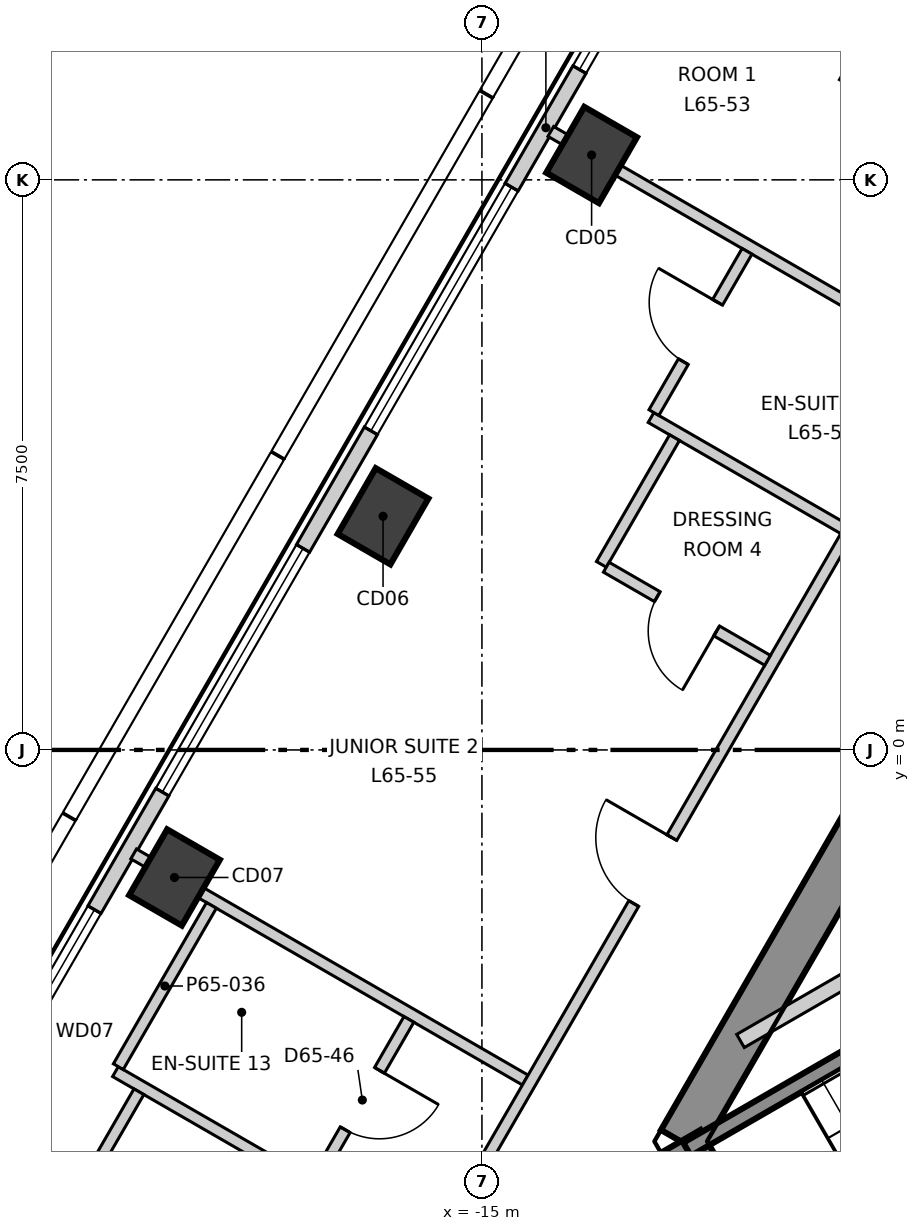
"""IFC4 building model, lengths in metres.
Left out: names, types, materials, properties, quantities, classifications, styles, units other than length and angle.
Written with IfcOpenShell. Run it as: python <this file> out.ifc"""

import sys

from ifc_helpers import new_model, si_unit, direction, frame, frame_2d, origin, origin_2d, place, context, subcontext, project, spatial, polyline, rectangle, outline, extrude, element, fill, save


model = new_model("IFC4")
c1 = context("Model", 3, precision=1e-05, world=origin(), true_north=direction((0.0, 1.0)))
c2 = subcontext(c1, "Body", "Model", "MODEL_VIEW")
j1 = project(units=[si_unit("LENGTHUNIT", "METRE"), si_unit("PLANEANGLEUNIT", "RADIAN")], contexts=[c1])
p1 = place(None, origin())
s1 = spatial("IfcSite", under=j1, at=p1, CompositionType="ELEMENT")
p2 = place(p1, origin())
s2 = spatial("IfcBuilding", under=s1, at=p2, CompositionType="ELEMENT")
p3 = place(p2, frame((0.0, 0.0, 279.1)))
s3 = spatial("IfcBuildingStorey", under=s2, at=p3, CompositionType="ELEMENT", Elevation=279.1)
p4 = place(p3, frame((-1.732, 13.3, -0.3), z_axis=(0.0, 0.0, 1.0), x_axis=(-0.500000539815, -0.866025092122, 0.0)))
e1 = element("IfcWall", 1, at=p4, inside=s3, PredefinedType="SHEAR", context=c2, shape_type="SweptSolid", body=[
    extrude(outline(polyline([(-0.173, -0.3), (1.795, -0.3), (3.763, -0.3), (5.732, -0.3), (7.7, -0.3), (9.668, -0.301), (11.637, -0.301), (13.605, -0.301), (15.573, -0.301), (17.542, -0.301), (19.51, -0.301), (21.478, -0.301), (21.131, 0.3), (19.226, 0.3), (17.321, 0.3), (15.415, 0.3), (13.51, 0.3), (11.605, 0.3), (9.699, 0.3), (7.794, 0.3), (5.889, 0.3), (3.984, 0.3), (2.078, 0.3), (0.173, 0.3), (-0.173, -0.3)])), origin(), (0.0, 0.0, 1.0), 3.6),
])
p5 = place(p4, frame((10.102, 0.0, 0.3)))
e2 = element("IfcOpeningElement", 2, at=p5, cuts=e1, PredefinedType="OPENING", context=c2, shape_type="SweptSolid", body=[
    extrude(rectangle(XDim=1.1, YDim=2.1, at=frame_2d((0.55, 1.05))), frame((0.0, 0.31, 0.0), z_axis=(0.0, -1.0, 0.0), x_axis=(1.0, 0.0, 0.0)), (0.0, 0.0, 1.0), 0.621),
])
p6 = place(p4, frame((15.627, 0.0, 0.3)))
e3 = element("IfcOpeningElement", 3, at=p6, cuts=e1, PredefinedType="OPENING", context=c2, shape_type="SweptSolid", body=[
    extrude(rectangle(XDim=0.9, YDim=2.1, at=frame_2d((0.45, 1.05))), frame((0.0, 0.31, 0.0), z_axis=(0.0, -1.0, 0.0), x_axis=(1.0, 0.0, 0.0)), (0.0, 0.0, 1.0), 0.621),
])
p7 = place(p3, frame((-12.384, -5.15, -0.3), z_axis=(0.0, 0.0, 1.0), x_axis=(0.49997462182, -0.866040055388, 0.0)))
e4 = element("IfcWall", 4, at=p7, inside=s3, PredefinedType="SHEAR", context=c2, shape_type="SweptSolid", body=[
    extrude(outline(polyline([(-0.173, -0.301), (1.732, -0.301), (3.637, -0.3), (3.291, 0.3), (1.732, 0.3), (0.173, 0.3), (-0.173, -0.301)])), origin(), (0.0, 0.0, 1.0), 3.6),
])
p8 = place(p7, frame((1.032, 0.0, 0.3)))
e5 = element("IfcOpeningElement", 5, at=p8, cuts=e4, PredefinedType="OPENING", context=c2, shape_type="SweptSolid", body=[
    extrude(rectangle(XDim=1.4, YDim=2.1, at=frame_2d((0.7, 1.05))), frame((0.0, 0.31, 0.0), z_axis=(0.0, -1.0, 0.0), x_axis=(1.0, 0.0, 0.0)), (0.0, 0.0, 1.0), 0.621),
])
for number, where, z_axis, x_axis in (
    (6, (-13.557, 7.827, -0.3), (0.0, 0.0, 1.0), (0.5, 0.866, 0.0)),
    (7, (-16.301, 3.074, -0.3), (0.0, 0.0, 1.0), (0.5, 0.866, 0.0)),
    (8, (-19.045, -1.678, -0.3), (0.0, 0.0, 1.0), (0.5, 0.866, 0.0)),
):
    element("IfcColumn", number, at=place(p3, frame(where, z_axis=z_axis, x_axis=x_axis)), inside=s3, PredefinedType="COLUMN", context=c2, shape_type="SweptSolid", body=[
        extrude(rectangle(XDim=1.0, YDim=0.8, at=origin_2d()), origin(), (0.0, 0.0, 1.0), 3.6),
    ])
p9 = place(p3, frame((-2.536, 28.316, 0.0), z_axis=(0.0, 0.0, 1.0), x_axis=(-0.500006870765, -0.86602143691, 0.0)))
e9 = element("IfcWall", 9, at=p9, inside=s3, PredefinedType="ELEMENTEDWALL", context=c2, shape_type="SweptSolid", body=[
    extrude(rectangle(XDim=46.49, YDim=0.2, at=frame_2d((23.245, 0.0))), origin(), (0.0, 0.0, 1.0), 3.3),
])
p10 = place(p9, frame((2.196, 0.0, 0.9)))
e10 = element("IfcOpeningElement", 10, at=p10, cuts=e9, PredefinedType="OPENING", context=c2, shape_type="SweptSolid", body=[
    extrude(rectangle(XDim=3.7, YDim=2.2, at=frame_2d((1.85, 1.1))), frame((0.0, 0.11, 0.0), z_axis=(0.0, -1.0, 0.0), x_axis=(1.0, 0.0, 0.0)), (0.0, 0.0, 1.0), 0.22),
])
p11 = place(p9, frame((7.684, 0.0, 0.9)))
e11 = element("IfcOpeningElement", 11, at=p11, cuts=e9, PredefinedType="OPENING", context=c2, shape_type="SweptSolid", body=[
    extrude(rectangle(XDim=3.7, YDim=2.2, at=frame_2d((1.85, 1.1))), frame((0.0, 0.11, 0.0), z_axis=(0.0, -1.0, 0.0), x_axis=(1.0, 0.0, 0.0)), (0.0, 0.0, 1.0), 0.22),
])
p12 = place(p9, frame((13.172, 0.0, 0.9)))
e12 = element("IfcOpeningElement", 12, at=p12, cuts=e9, PredefinedType="OPENING", context=c2, shape_type="SweptSolid", body=[
    extrude(rectangle(XDim=3.7, YDim=2.2, at=frame_2d((1.85, 1.1))), frame((0.0, 0.11, 0.0), z_axis=(0.0, -1.0, 0.0), x_axis=(1.0, 0.0, 0.0)), (0.0, 0.0, 1.0), 0.22),
])
p13 = place(p9, frame((18.66, 0.0, 0.9)))
e13 = element("IfcOpeningElement", 13, at=p13, cuts=e9, PredefinedType="OPENING", context=c2, shape_type="SweptSolid", body=[
    extrude(rectangle(XDim=3.7, YDim=2.2, at=frame_2d((1.85, 1.1))), frame((0.0, 0.11, 0.0), z_axis=(0.0, -1.0, 0.0), x_axis=(1.0, 0.0, 0.0)), (0.0, 0.0, 1.0), 0.22),
])
p14 = place(p9, frame((24.148, 0.0, 0.9)))
e14 = element("IfcOpeningElement", 14, at=p14, cuts=e9, PredefinedType="OPENING", context=c2, shape_type="SweptSolid", body=[
    extrude(rectangle(XDim=3.7, YDim=2.2, at=frame_2d((1.85, 1.1))), frame((0.0, 0.11, 0.0), z_axis=(0.0, -1.0, 0.0), x_axis=(1.0, 0.0, 0.0)), (0.0, 0.0, 1.0), 0.22),
])
p15 = place(p9, frame((29.636, 0.0, 0.9)))
e15 = element("IfcOpeningElement", 15, at=p15, cuts=e9, PredefinedType="OPENING", context=c2, shape_type="SweptSolid", body=[
    extrude(rectangle(XDim=3.7, YDim=2.2, at=frame_2d((1.85, 1.1))), frame((0.0, 0.11, 0.0), z_axis=(0.0, -1.0, 0.0), x_axis=(1.0, 0.0, 0.0)), (0.0, 0.0, 1.0), 0.22),
])
p16 = place(p9, frame((35.124, 0.0, 0.9)))
e16 = element("IfcOpeningElement", 16, at=p16, cuts=e9, PredefinedType="OPENING", context=c2, shape_type="SweptSolid", body=[
    extrude(rectangle(XDim=3.7, YDim=2.2, at=frame_2d((1.85, 1.1))), frame((0.0, 0.11, 0.0), z_axis=(0.0, -1.0, 0.0), x_axis=(1.0, 0.0, 0.0)), (0.0, 0.0, 1.0), 0.22),
])
p17 = place(p9, frame((40.612, 0.0, 0.9)))
e17 = element("IfcOpeningElement", 17, at=p17, cuts=e9, PredefinedType="OPENING", context=c2, shape_type="SweptSolid", body=[
    extrude(rectangle(XDim=3.7, YDim=2.2, at=frame_2d((1.85, 1.1))), frame((0.0, 0.11, 0.0), z_axis=(0.0, -1.0, 0.0), x_axis=(1.0, 0.0, 0.0)), (0.0, 0.0, 1.0), 0.22),
])
p18 = place(p3, frame((-19.582, -1.368, 0.0), z_axis=(0.0, 0.0, 1.0), x_axis=(0.865986712877, -0.50006700863, 0.0)))
e18 = element("IfcWall", 18, at=p18, inside=s3, PredefinedType="PARTITIONING", context=c2, shape_type="SweptSolid", body=[
    extrude(rectangle(XDim=5.949, YDim=0.15, at=frame_2d((2.975, 0.0))), origin(), (0.0, 0.0, 1.0), 3.3),
])
p19 = place(p3, frame((-17.678, -10.119, 0.0), z_axis=(0.0, 0.0, 1.0), x_axis=(0.500003190174, 0.866023561929, 0.0)))
e19 = element("IfcWall", 19, at=p19, inside=s3, PredefinedType="PARTITIONING", context=c2, shape_type="SweptSolid", body=[
    extrude(rectangle(XDim=35.356, YDim=0.15, at=frame_2d((17.678, 0.0))), origin(), (0.0, 0.0, 1.0), 3.3),
])
p20 = place(p19, frame((28.706, 0.0, 0.0)))
e20 = element("IfcOpeningElement", 20, at=p20, cuts=e19, PredefinedType="OPENING", context=c2, shape_type="SweptSolid", body=[
    extrude(rectangle(XDim=1.0, YDim=2.1, at=frame_2d((0.5, 1.05))), frame((0.0, 0.085, 0.0), z_axis=(0.0, -1.0, 0.0), x_axis=(1.0, 0.0, 0.0)), (0.0, 0.0, 1.0), 0.17),
])
p21 = place(p19, frame((18.74, 0.0, 0.0)))
e21 = element("IfcOpeningElement", 21, at=p21, cuts=e19, PredefinedType="OPENING", context=c2, shape_type="SweptSolid", body=[
    extrude(rectangle(XDim=1.0, YDim=2.1, at=frame_2d((0.5, 1.05))), frame((0.0, 0.085, 0.0), z_axis=(0.0, -1.0, 0.0), x_axis=(1.0, 0.0, 0.0)), (0.0, 0.0, 1.0), 0.17),
])
p22 = place(p19, frame((9.352, 0.0, 0.0)))
e22 = element("IfcOpeningElement", 22, at=p22, cuts=e19, PredefinedType="OPENING", context=c2, shape_type="SweptSolid", body=[
    extrude(rectangle(XDim=1.0, YDim=2.1, at=frame_2d((0.5, 1.05))), frame((0.0, 0.085, 0.0), z_axis=(0.0, -1.0, 0.0), x_axis=(1.0, 0.0, 0.0)), (0.0, 0.0, 1.0), 0.17),
])
p23 = place(p19, frame((2.777, 0.0, 0.0)))
e23 = element("IfcOpeningElement", 23, at=p23, cuts=e19, PredefinedType="OPENING", context=c2, shape_type="SweptSolid", body=[
    extrude(rectangle(XDim=1.0, YDim=2.1, at=frame_2d((0.5, 1.05))), frame((0.0, 0.085, 0.0), z_axis=(0.0, -1.0, 0.0), x_axis=(1.0, 0.0, 0.0)), (0.0, 0.0, 1.0), 0.17),
])
p24 = place(p3, frame((-14.094, 8.137, 0.0), z_axis=(0.0, 0.0, 1.0), x_axis=(0.866004483474, -0.50003623329, 0.0)))
e24 = element("IfcWall", 24, at=p24, inside=s3, PredefinedType="PARTITIONING", context=c2, shape_type="SweptSolid", body=[
    extrude(rectangle(XDim=5.949, YDim=0.15, at=frame_2d((2.975, 0.0))), origin(), (0.0, 0.0, 1.0), 2.8),
])
p25 = place(p3, frame((-19.822, -4.232, 0.0), z_axis=(0.0, 0.0, 1.0), x_axis=(0.866145293007, -0.499792288257, 0.0)))
e25 = element("IfcWall", 25, at=p25, inside=s3, PredefinedType="PARTITIONING", context=c2, shape_type="SweptSolid", body=[
    extrude(rectangle(XDim=2.926, YDim=0.15, at=frame_2d((1.463, 0.0))), origin(), (0.0, 0.0, 1.0), 3.3),
])
p26 = place(p3, frame((-20.475, -6.164, 0.0), z_axis=(0.0, 0.0, 1.0), x_axis=(0.499890818081, 0.866088430819, 0.0)))
e26 = element("IfcWall", 26, at=p26, inside=s3, PredefinedType="PARTITIONING", context=c2, shape_type="SweptSolid", body=[
    extrude(rectangle(XDim=1.925, YDim=0.15, at=frame_2d((0.962, 0.0))), origin(), (0.0, 0.0, 1.0), 3.3),
])
p27 = place(p3, frame((-18.186, -7.399, 0.0), z_axis=(0.0, 0.0, 1.0), x_axis=(0.49999788721, 0.866026623601, 0.0)))
e27 = element("IfcWall", 27, at=p27, inside=s3, PredefinedType="PARTITIONING", context=c2, shape_type="SweptSolid", body=[
    extrude(rectangle(XDim=4.45, YDim=0.15, at=frame_2d((2.225, 0.0))), origin(), (0.0, 0.0, 1.0), 3.3),
])
p28 = place(p27, frame((2.775, 0.0, 0.0)))
e28 = element("IfcOpeningElement", 28, at=p28, cuts=e27, PredefinedType="OPENING", context=c2, shape_type="SweptSolid", body=[
    extrude(rectangle(XDim=0.9, YDim=2.1, at=frame_2d((0.45, 1.05))), frame((0.0, 0.085, 0.0), z_axis=(0.0, -1.0, 0.0), x_axis=(1.0, 0.0, 0.0)), (0.0, 0.0, 1.0), 0.17),
])
p29 = place(p3, frame((-19.784, -4.167, 0.0), z_axis=(0.0, 0.0, 1.0), x_axis=(0.499900713578, 0.866082719239, 0.0)))
e29 = element("IfcWall", 29, at=p29, inside=s3, PredefinedType="PARTITIONING", context=c2, shape_type="SweptSolid", body=[
    extrude(rectangle(XDim=2.45, YDim=0.15, at=frame_2d((1.225, 0.0))), origin(), (0.0, 0.0, 1.0), 3.3),
])
p30 = place(p3, frame((-12.775, 4.373, 0.0), z_axis=(0.0, 0.0, 1.0), x_axis=(0.866061874444, -0.499936825643, 0.0)))
e30 = element("IfcWall", 30, at=p30, inside=s3, PredefinedType="PARTITIONING", context=c2, shape_type="SweptSolid", body=[
    extrude(rectangle(XDim=2.925, YDim=0.15, at=frame_2d((1.462, 0.0))), origin(), (0.0, 0.0, 1.0), 3.3),
])
p31 = place(p3, frame((-12.737, 4.438, 0.0), z_axis=(0.0, 0.0, 1.0), x_axis=(0.499975448907, 0.8660395779, 0.0)))
e31 = element("IfcWall", 31, at=p31, inside=s3, PredefinedType="PARTITIONING", context=c2, shape_type="SweptSolid", body=[
    extrude(rectangle(XDim=2.45, YDim=0.15, at=frame_2d((1.225, 0.0))), origin(), (0.0, 0.0, 1.0), 3.3),
])
p32 = place(p31, frame((0.775, 0.0, 0.0)))
e32 = element("IfcOpeningElement", 32, at=p32, cuts=e31, PredefinedType="OPENING", context=c2, shape_type="SweptSolid", body=[
    extrude(rectangle(XDim=0.9, YDim=2.1, at=frame_2d((0.45, 1.05))), frame((0.0, 0.085, 0.0), z_axis=(0.0, -1.0, 0.0), x_axis=(1.0, 0.0, 0.0)), (0.0, 0.0, 1.0), 0.17),
])
p33 = place(p3, frame((-10.231, 8.78, 0.0), z_axis=(0.0, 0.0, 1.0), x_axis=(0.500124626836, 0.865953438489, 0.0)))
e33 = element("IfcWall", 33, at=p33, inside=s3, PredefinedType="PARTITIONING", context=c2, shape_type="SweptSolid", body=[
    extrude(rectangle(XDim=2.925, YDim=0.15, at=frame_2d((1.462, 0.0))), origin(), (0.0, 0.0, 1.0), 3.3),
])
p34 = place(p3, frame((-13.428, 2.441, 0.0), z_axis=(0.0, 0.0, 1.0), x_axis=(0.499795662447, 0.866143345988, 0.0)))
e34 = element("IfcWall", 34, at=p34, inside=s3, PredefinedType="PARTITIONING", context=c2, shape_type="SweptSolid", body=[
    extrude(rectangle(XDim=1.925, YDim=0.15, at=frame_2d((0.962, 0.0))), origin(), (0.0, 0.0, 1.0), 3.3),
])
p35 = place(p3, frame((-13.364, 2.404, 0.0), z_axis=(0.0, 0.0, 1.0), x_axis=(0.8660395779, -0.499975448907, 0.0)))
e35 = element("IfcWall", 35, at=p35, inside=s3, PredefinedType="PARTITIONING", context=c2, shape_type="SweptSolid", body=[
    extrude(rectangle(XDim=2.45, YDim=0.15, at=frame_2d((1.225, 0.0))), origin(), (0.0, 0.0, 1.0), 3.3),
])
p36 = place(p35, frame((0.776, 0.0, 0.0)))
e36 = element("IfcOpeningElement", 36, at=p36, cuts=e35, PredefinedType="OPENING", context=c2, shape_type="SweptSolid", body=[
    extrude(rectangle(XDim=0.9, YDim=2.1, at=frame_2d((0.45, 1.05))), frame((0.0, 0.085, 0.0), z_axis=(0.0, -1.0, 0.0), x_axis=(1.0, 0.0, 0.0)), (0.0, 0.0, 1.0), 0.17),
])
p37 = place(p3, frame((-11.598, -3.829, 0.0), z_axis=(0.0, 0.0, 1.0), x_axis=(0.865968383994, 0.500098748171, 0.0)))
e37 = element("IfcWall", 37, at=p37, inside=s3, PredefinedType="SOLIDWALL", context=c2, shape_type="SweptSolid", body=[
    extrude(rectangle(XDim=4.867, YDim=0.2, at=frame_2d((2.434, 0.0))), origin(), (0.0, 0.0, 1.0), 3.3),
])
p38 = place(p3, frame((-12.301, -5.254, 0.0), z_axis=(0.0, 0.0, 1.0), x_axis=(0.866068467981, 0.499925403204, 0.0)))
e38 = element("IfcWall", 38, at=p38, inside=s3, PredefinedType="SOLIDWALL", context=c2, shape_type="SweptSolid", body=[
    extrude(rectangle(XDim=6.665, YDim=0.2, at=frame_2d((3.332, 0.0))), origin(), (0.0, 0.0, 1.0), 3.3),
])
p39 = place(p3, frame((-10.701, -8.026, 0.0), z_axis=(0.0, 0.0, 1.0), x_axis=(0.866005022404, 0.500035299925, 0.0)))
e39 = element("IfcWall", 39, at=p39, inside=s3, PredefinedType="SOLIDWALL", context=c2, shape_type="SweptSolid", body=[
    extrude(rectangle(XDim=6.665, YDim=0.2, at=frame_2d((3.333, 0.0))), origin(), (0.0, 0.0, 1.0), 3.3),
])
p40 = place(p13, origin())
e40 = element("IfcWindow", 40, at=p40, inside=s3, PartitioningType="SINGLE_PANEL", PredefinedType="WINDOW", context=c2, shape_type="SweptSolid", body=[
    extrude(rectangle(XDim=3.7, YDim=2.2, at=frame_2d((1.85, 1.1))), frame((0.0, 0.03, 0.0), z_axis=(0.0, -1.0, 0.0), x_axis=(1.0, 0.0, 0.0)), (0.0, 0.0, 1.0), 0.06),
])
fill(e13, e40)
p41 = place(p14, origin())
e41 = element("IfcWindow", 41, at=p41, inside=s3, PartitioningType="SINGLE_PANEL", PredefinedType="WINDOW", context=c2, shape_type="SweptSolid", body=[
    extrude(rectangle(XDim=3.7, YDim=2.2, at=frame_2d((1.85, 1.1))), frame((0.0, 0.03, 0.0), z_axis=(0.0, -1.0, 0.0), x_axis=(1.0, 0.0, 0.0)), (0.0, 0.0, 1.0), 0.06),
])
fill(e14, e41)
p42 = place(p15, origin())
e42 = element("IfcWindow", 42, at=p42, inside=s3, PartitioningType="SINGLE_PANEL", PredefinedType="WINDOW", context=c2, shape_type="SweptSolid", body=[
    extrude(rectangle(XDim=3.7, YDim=2.2, at=frame_2d((1.85, 1.1))), frame((0.0, 0.03, 0.0), z_axis=(0.0, -1.0, 0.0), x_axis=(1.0, 0.0, 0.0)), (0.0, 0.0, 1.0), 0.06),
])
fill(e15, e42)
p43 = place(p16, origin())
e43 = element("IfcWindow", 43, at=p43, inside=s3, PartitioningType="SINGLE_PANEL", PredefinedType="WINDOW", context=c2, shape_type="SweptSolid", body=[
    extrude(rectangle(XDim=3.7, YDim=2.2, at=frame_2d((1.85, 1.1))), frame((0.0, 0.03, 0.0), z_axis=(0.0, -1.0, 0.0), x_axis=(1.0, 0.0, 0.0)), (0.0, 0.0, 1.0), 0.06),
])
fill(e16, e43)
p44 = place(p22, origin())
e44 = element("IfcDoor", 44, at=p44, inside=s3, OperationType="SINGLE_SWING_LEFT", PredefinedType="DOOR", context=c2, shape_type="SweptSolid", body=[
    extrude(rectangle(XDim=1.0, YDim=2.1, at=frame_2d((0.5, 1.05))), frame((0.0, 0.025, 0.0), z_axis=(0.0, -1.0, 0.0), x_axis=(1.0, 0.0, 0.0)), (0.0, 0.0, 1.0), 0.05),
])
fill(e22, e44)
p45 = place(p32, origin())
e45 = element("IfcDoor", 45, at=p45, inside=s3, OperationType="SINGLE_SWING_LEFT", PredefinedType="DOOR", context=c2, shape_type="SweptSolid", body=[
    extrude(rectangle(XDim=0.9, YDim=2.1, at=frame_2d((0.45, 1.05))), frame((0.0, 0.025, 0.0), z_axis=(0.0, -1.0, 0.0), x_axis=(1.0, 0.0, 0.0)), (0.0, 0.0, 1.0), 0.05),
])
fill(e32, e45)
p46 = place(p36, origin())
e46 = element("IfcDoor", 46, at=p46, inside=s3, OperationType="SINGLE_SWING_RIGHT", PredefinedType="DOOR", context=c2, shape_type="SweptSolid", body=[
    extrude(rectangle(XDim=0.9, YDim=2.1, at=frame_2d((0.45, 1.05))), frame((0.0, 0.025, 0.0), z_axis=(0.0, -1.0, 0.0), x_axis=(1.0, 0.0, 0.0)), (0.0, 0.0, 1.0), 0.05),
])
fill(e36, e46)
p47 = place(p28, origin())
e47 = element("IfcDoor", 47, at=p47, inside=s3, OperationType="SINGLE_SWING_RIGHT", PredefinedType="DOOR", context=c2, shape_type="SweptSolid", body=[
    extrude(rectangle(XDim=0.9, YDim=2.1, at=frame_2d((0.45, 1.05))), frame((0.0, 0.025, 0.0), z_axis=(0.0, -1.0, 0.0), x_axis=(1.0, 0.0, 0.0)), (0.0, 0.0, 1.0), 0.05),
])
fill(e28, e47)
save(model, sys.argv[1])
